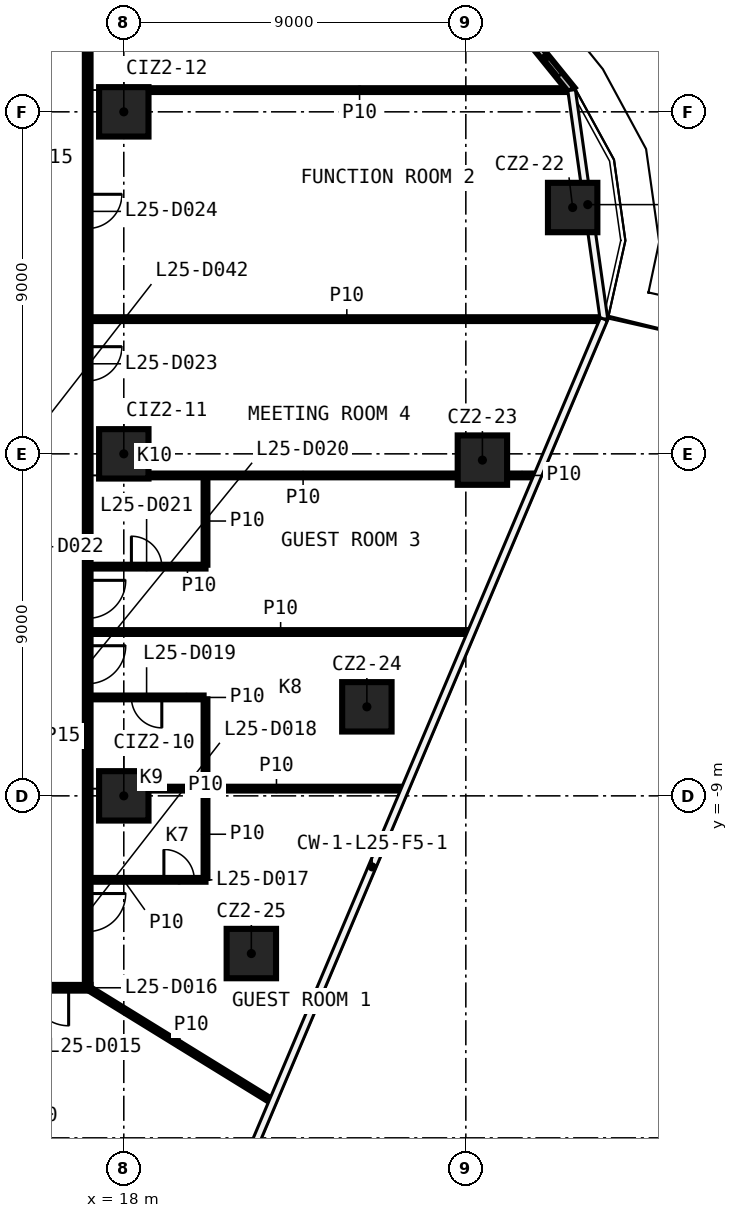
"""IFC4 building model, lengths in metres.
Left out: names, types, materials, properties, quantities, classifications, styles, units other than length and angle.
Written with IfcOpenShell. Run it as: python <this file> out.ifc"""

import sys

from ifc_helpers import new_model, si_unit, direction, frame, frame_2d, origin, origin_2d, place, context, subcontext, project, spatial, rectangle, extrude, element, fill, save


model = new_model("IFC4")
c1 = context("Model", 3, precision=1e-05, world=origin(), true_north=direction((0.0, 1.0)))
c2 = subcontext(c1, "Body", "Model", "MODEL_VIEW")
j1 = project(units=[si_unit("LENGTHUNIT", "METRE"), si_unit("PLANEANGLEUNIT", "RADIAN")], contexts=[c1])
p1 = place(None, origin())
s1 = spatial("IfcSite", under=j1, at=p1, CompositionType="ELEMENT")
p2 = place(p1, origin())
s2 = spatial("IfcBuilding", under=s1, at=p2, CompositionType="ELEMENT")
p3 = place(p2, frame((0.0, 0.0, 117.4)))
s3 = spatial("IfcBuildingStorey", under=s2, at=p3, CompositionType="ELEMENT", Elevation=117.4)
for number, where, z_axis, x_axis in (
    (1, (29.811, 6.482, 0.0), (0.0, 0.0, 1.0), (1.0, 0.0, 0.0)),
    (2, (27.436, -0.165, 0.0), (0.0, 0.0, 1.0), (1.0, 0.0, 0.0)),
    (3, (24.396, -6.657, 0.0), (0.0, 0.0, 1.0), (1.0, 0.0, 0.0)),
    (4, (21.356, -13.15, 0.0), (0.0, 0.0, 1.0), (1.0, 0.0, 0.0)),
    (5, (18.0, -9.0, 0.0), (0.0, 0.0, 1.0), (1.0, 0.0, 0.0)),
    (6, (18.0, 0.0, 0.0), (0.0, 0.0, 1.0), (1.0, 0.0, 0.0)),
    (7, (18.0, 9.0, 0.0), (0.0, 0.0, 1.0), (1.0, 0.0, 0.0)),
):
    element("IfcColumn", number, at=place(p3, frame(where, z_axis=z_axis, x_axis=x_axis)), inside=s3, PredefinedType="COLUMN", context=c2, shape_type="SweptSolid", body=[
        extrude(rectangle(XDim=1.3, YDim=1.3, at=origin_2d()), origin(), (0.0, 0.0, 1.0), 3.3),
    ])
p4 = place(p3, frame((17.125, -14.05, 0.0), z_axis=(0.0, 0.0, 1.0), x_axis=(-1.0, 0.0, 0.0)))
e8 = element("IfcWall", 8, at=p4, inside=s3, PredefinedType="PARTITIONING", context=c2, shape_type="SweptSolid", body=[
    extrude(rectangle(XDim=34.25, YDim=0.15, at=frame_2d((17.125, 0.0))), origin(), (0.0, 0.0, 1.0), 3.3),
])
p5 = place(p4, frame((32.089, 0.0, 0.0)))
e9 = element("IfcOpeningElement", 9, at=p5, cuts=e8, PredefinedType="OPENING", context=c2, shape_type="SweptSolid", body=[
    extrude(rectangle(XDim=0.9, YDim=2.1, at=frame_2d((0.45, 1.05))), frame((0.0, 0.085, 0.0), z_axis=(0.0, -1.0, 0.0), x_axis=(1.0, 0.0, 0.0)), (0.0, 0.0, 1.0), 0.17),
])
p6 = place(p4, frame((25.666, 0.0, 0.0)))
e10 = element("IfcOpeningElement", 10, at=p6, cuts=e8, PredefinedType="OPENING", context=c2, shape_type="SweptSolid", body=[
    extrude(rectangle(XDim=1.0, YDim=2.1, at=frame_2d((0.5, 1.05))), frame((0.0, 0.085, 0.0), z_axis=(0.0, -1.0, 0.0), x_axis=(1.0, 0.0, 0.0)), (0.0, 0.0, 1.0), 0.17),
])
p7 = place(p4, frame((18.714, 0.0, 0.0)))
e11 = element("IfcOpeningElement", 11, at=p7, cuts=e8, PredefinedType="OPENING", context=c2, shape_type="SweptSolid", body=[
    extrude(rectangle(XDim=1.0, YDim=2.1, at=frame_2d((0.5, 1.05))), frame((0.0, 0.085, 0.0), z_axis=(0.0, -1.0, 0.0), x_axis=(1.0, 0.0, 0.0)), (0.0, 0.0, 1.0), 0.17),
])
p8 = place(p4, frame((16.558, 0.0, 0.0)))
e12 = element("IfcOpeningElement", 12, at=p8, cuts=e8, PredefinedType="OPENING", context=c2, shape_type="SweptSolid", body=[
    extrude(rectangle(XDim=1.0, YDim=2.1, at=frame_2d((0.5, 1.05))), frame((0.0, 0.085, 0.0), z_axis=(0.0, -1.0, 0.0), x_axis=(1.0, 0.0, 0.0)), (0.0, 0.0, 1.0), 0.17),
])
p9 = place(p4, frame((9.602, 0.0, 0.0)))
e13 = element("IfcOpeningElement", 13, at=p9, cuts=e8, PredefinedType="OPENING", context=c2, shape_type="SweptSolid", body=[
    extrude(rectangle(XDim=1.0, YDim=2.1, at=frame_2d((0.5, 1.05))), frame((0.0, 0.085, 0.0), z_axis=(0.0, -1.0, 0.0), x_axis=(1.0, 0.0, 0.0)), (0.0, 0.0, 1.0), 0.17),
])
p10 = place(p4, frame((7.451, 0.0, 0.0)))
e14 = element("IfcOpeningElement", 14, at=p10, cuts=e8, PredefinedType="OPENING", context=c2, shape_type="SweptSolid", body=[
    extrude(rectangle(XDim=1.0, YDim=2.1, at=frame_2d((0.5, 1.05))), frame((0.0, 0.085, 0.0), z_axis=(0.0, -1.0, 0.0), x_axis=(1.0, 0.0, 0.0)), (0.0, 0.0, 1.0), 0.17),
])
p11 = place(p4, frame((0.576, 0.0, 0.0)))
e15 = element("IfcOpeningElement", 15, at=p11, cuts=e8, PredefinedType="OPENING", context=c2, shape_type="SweptSolid", body=[
    extrude(rectangle(XDim=1.0, YDim=2.1, at=frame_2d((0.5, 1.05))), frame((0.0, 0.085, 0.0), z_axis=(0.0, -1.0, 0.0), x_axis=(1.0, 0.0, 0.0)), (0.0, 0.0, 1.0), 0.17),
])
p12 = place(p3, frame((17.125, -11.21, 0.0), z_axis=(0.0, 0.0, 1.0), x_axis=(1.0, 0.0, 0.0)))
e16 = element("IfcWall", 16, at=p12, inside=s3, PredefinedType="PARTITIONING", context=c2, shape_type="SweptSolid", body=[
    extrude(rectangle(XDim=3.025, YDim=0.1, at=frame_2d((1.512, 0.0))), origin(), (0.0, 0.0, 1.0), 3.3),
])
p13 = place(p12, frame((1.93, 0.0, 0.0)))
e17 = element("IfcOpeningElement", 17, at=p13, cuts=e16, PredefinedType="OPENING", context=c2, shape_type="SweptSolid", body=[
    extrude(rectangle(XDim=0.8, YDim=2.1, at=frame_2d((0.4, 1.05))), frame((0.0, 0.06, 0.0), z_axis=(0.0, -1.0, 0.0), x_axis=(1.0, 0.0, 0.0)), (0.0, 0.0, 1.0), 0.12),
])
p14 = place(p3, frame((18.65, -8.81, 0.0), z_axis=(0.0, 0.0, 1.0), x_axis=(1.0, 0.0, 0.0)))
e18 = element("IfcWall", 18, at=p14, inside=s3, PredefinedType="PARTITIONING", context=c2, shape_type="SweptSolid", body=[
    extrude(rectangle(XDim=6.735, YDim=0.1, at=frame_2d((3.367, 0.0))), origin(), (0.0, 0.0, 1.0), 3.3),
])
p15 = place(p3, frame((20.1, -6.41, 0.0), z_axis=(0.0, 0.0, 1.0), x_axis=(-1.0, 0.0, 0.0)))
e19 = element("IfcWall", 19, at=p15, inside=s3, PredefinedType="PARTITIONING", context=c2, shape_type="SweptSolid", body=[
    extrude(rectangle(XDim=2.975, YDim=0.1, at=frame_2d((1.488, 0.0))), origin(), (0.0, 0.0, 1.0), 3.3),
])
p16 = place(p15, frame((1.1, 0.0, 0.0)))
e20 = element("IfcOpeningElement", 20, at=p16, cuts=e19, PredefinedType="OPENING", context=c2, shape_type="SweptSolid", body=[
    extrude(rectangle(XDim=0.8, YDim=2.1, at=frame_2d((0.4, 1.05))), frame((0.0, 0.06, 0.0), z_axis=(0.0, -1.0, 0.0), x_axis=(1.0, 0.0, 0.0)), (0.0, 0.0, 1.0), 0.12),
])
p17 = place(p3, frame((17.125, -4.689, 0.0), z_axis=(0.0, 0.0, 1.0), x_axis=(1.0, 0.0, 0.0)))
e21 = element("IfcWall", 21, at=p17, inside=s3, PredefinedType="PARTITIONING", context=c2, shape_type="SweptSolid", body=[
    extrude(rectangle(XDim=10.003, YDim=0.1, at=frame_2d((5.001, 0.0))), origin(), (0.0, 0.0, 1.0), 3.3),
])
p18 = place(p3, frame((17.125, -2.968, 0.0), z_axis=(0.0, 0.0, 1.0), x_axis=(1.0, 0.0, 0.0)))
e22 = element("IfcWall", 22, at=p18, inside=s3, PredefinedType="PARTITIONING", context=c2, shape_type="SweptSolid", body=[
    extrude(rectangle(XDim=3.025, YDim=0.1, at=frame_2d((1.512, 0.0))), origin(), (0.0, 0.0, 1.0), 3.3),
])
p19 = place(p18, frame((1.075, 0.0, 0.0)))
e23 = element("IfcOpeningElement", 23, at=p19, cuts=e22, PredefinedType="OPENING", context=c2, shape_type="SweptSolid", body=[
    extrude(rectangle(XDim=0.8, YDim=2.1, at=frame_2d((0.4, 1.05))), frame((0.0, 0.06, 0.0), z_axis=(0.0, -1.0, 0.0), x_axis=(1.0, 0.0, 0.0)), (0.0, 0.0, 1.0), 0.12),
])
p20 = place(p3, frame((18.65, -0.568, 0.0), z_axis=(0.0, 0.0, 1.0), x_axis=(1.0, 0.0, 0.0)))
e24 = element("IfcWall", 24, at=p20, inside=s3, PredefinedType="PARTITIONING", context=c2, shape_type="SweptSolid", body=[
    extrude(rectangle(XDim=8.136, YDim=0.1, at=frame_2d((4.068, 0.0))), origin(), (0.0, 0.0, 1.0), 3.3),
])
p21 = place(p3, frame((28.086, -0.568, 0.0), z_axis=(0.0, 0.0, 1.0), x_axis=(1.0, 0.0, 0.0)))
e25 = element("IfcWall", 25, at=p21, inside=s3, PredefinedType="PARTITIONING", context=c2, shape_type="SweptSolid", body=[
    extrude(rectangle(XDim=0.786, YDim=0.1, at=frame_2d((0.393, 0.0))), origin(), (0.0, 0.0, 1.0), 3.3),
])
p22 = place(p3, frame((17.125, 3.545, 0.0), z_axis=(0.0, 0.0, 1.0), x_axis=(1.0, 0.0, 0.0)))
e26 = element("IfcWall", 26, at=p22, inside=s3, PredefinedType="PARTITIONING", context=c2, shape_type="SweptSolid", body=[
    extrude(rectangle(XDim=13.487, YDim=0.1, at=frame_2d((6.743, 0.0))), origin(), (0.0, 0.0, 1.0), 3.3),
])
p23 = place(p3, frame((18.65, 9.572, 0.0), z_axis=(0.0, 0.0, 1.0), x_axis=(1.0, 0.0, 0.0)))
e27 = element("IfcWall", 27, at=p23, inside=s3, PredefinedType="PARTITIONING", context=c2, shape_type="SweptSolid", body=[
    extrude(rectangle(XDim=11.107, YDim=0.1, at=frame_2d((5.554, 0.0))), origin(), (0.0, 0.0, 1.0), 3.3),
])
p24 = place(p3, frame((20.15, -11.16, 0.0), z_axis=(0.0, 0.0, 1.0), x_axis=(0.0, 1.0, 0.0)))
e28 = element("IfcWall", 28, at=p24, inside=s3, PredefinedType="PARTITIONING", context=c2, shape_type="SweptSolid", body=[
    extrude(rectangle(XDim=2.3, YDim=0.1, at=frame_2d((1.15, 0.0))), origin(), (0.0, 0.0, 1.0), 3.3),
])
p25 = place(p3, frame((20.15, -8.76, 0.0), z_axis=(0.0, 0.0, 1.0), x_axis=(0.0, 1.0, 0.0)))
e29 = element("IfcWall", 29, at=p25, inside=s3, PredefinedType="PARTITIONING", context=c2, shape_type="SweptSolid", body=[
    extrude(rectangle(XDim=2.3, YDim=0.1, at=frame_2d((1.15, 0.0))), origin(), (0.0, 0.0, 1.0), 3.3),
])
p26 = place(p3, frame((20.15, -2.918, 0.0), z_axis=(0.0, 0.0, 1.0), x_axis=(0.0, 1.0, 0.0)))
e30 = element("IfcWall", 30, at=p26, inside=s3, PredefinedType="PARTITIONING", context=c2, shape_type="SweptSolid", body=[
    extrude(rectangle(XDim=2.3, YDim=0.1, at=frame_2d((1.15, 0.0))), origin(), (0.0, 0.0, 1.0), 3.3),
])
p27 = place(p3, frame((17.05, 13.975, 0.0), z_axis=(0.0, 0.0, 1.0), x_axis=(0.0, -1.0, 0.0)))
e31 = element("IfcWall", 31, at=p27, inside=s3, PredefinedType="PARTITIONING", context=c2, shape_type="SweptSolid", body=[
    extrude(rectangle(XDim=27.95, YDim=0.15, at=frame_2d((13.975, 0.0))), origin(), (0.0, 0.0, 1.0), 3.3),
])
p28 = place(p27, frame((25.545, 0.0, 0.0)))
e32 = element("IfcOpeningElement", 32, at=p28, cuts=e31, PredefinedType="OPENING", context=c2, shape_type="SweptSolid", body=[
    extrude(rectangle(XDim=1.0, YDim=2.1, at=frame_2d((0.5, 1.05))), frame((0.0, 0.085, 0.0), z_axis=(0.0, -1.0, 0.0), x_axis=(1.0, 0.0, 0.0)), (0.0, 0.0, 1.0), 0.17),
])
p29 = place(p27, frame((19.024, 0.0, 0.0)))
e33 = element("IfcOpeningElement", 33, at=p29, cuts=e31, PredefinedType="OPENING", context=c2, shape_type="SweptSolid", body=[
    extrude(rectangle(XDim=1.0, YDim=2.1, at=frame_2d((0.5, 1.05))), frame((0.0, 0.085, 0.0), z_axis=(0.0, -1.0, 0.0), x_axis=(1.0, 0.0, 0.0)), (0.0, 0.0, 1.0), 0.17),
])
p30 = place(p27, frame((17.303, 0.0, 0.0)))
e34 = element("IfcOpeningElement", 34, at=p30, cuts=e31, PredefinedType="OPENING", context=c2, shape_type="SweptSolid", body=[
    extrude(rectangle(XDim=1.0, YDim=2.1, at=frame_2d((0.5, 1.05))), frame((0.0, 0.085, 0.0), z_axis=(0.0, -1.0, 0.0), x_axis=(1.0, 0.0, 0.0)), (0.0, 0.0, 1.0), 0.17),
])
p31 = place(p27, frame((11.155, 0.0, 0.0)))
e35 = element("IfcOpeningElement", 35, at=p31, cuts=e31, PredefinedType="OPENING", context=c2, shape_type="SweptSolid", body=[
    extrude(rectangle(XDim=0.9, YDim=2.1, at=frame_2d((0.45, 1.05))), frame((0.0, 0.085, 0.0), z_axis=(0.0, -1.0, 0.0), x_axis=(1.0, 0.0, 0.0)), (0.0, 0.0, 1.0), 0.17),
])
p32 = place(p27, frame((7.145, 0.0, 0.0)))
e36 = element("IfcOpeningElement", 36, at=p32, cuts=e31, PredefinedType="OPENING", context=c2, shape_type="SweptSolid", body=[
    extrude(rectangle(XDim=0.9, YDim=2.1, at=frame_2d((0.45, 1.05))), frame((0.0, 0.085, 0.0), z_axis=(0.0, -1.0, 0.0), x_axis=(1.0, 0.0, 0.0)), (0.0, 0.0, 1.0), 0.17),
])
p33 = place(p27, frame((2.168, 0.0, 0.0)))
e37 = element("IfcOpeningElement", 37, at=p33, cuts=e31, PredefinedType="OPENING", context=c2, shape_type="SweptSolid", body=[
    extrude(rectangle(XDim=0.9, YDim=2.1, at=frame_2d((0.45, 1.05))), frame((0.0, 0.085, 0.0), z_axis=(0.0, -1.0, 0.0), x_axis=(1.0, 0.0, 0.0)), (0.0, 0.0, 1.0), 0.17),
])
p34 = place(p3, frame((17.05, -14.05, 0.0), z_axis=(0.0, 0.0, 1.0), x_axis=(0.851278656023, -0.524713874221, 0.0)))
e38 = element("IfcWall", 38, at=p34, inside=s3, PredefinedType="PARTITIONING", context=c2, shape_type="SweptSolid", body=[
    extrude(rectangle(XDim=5.7, YDim=0.1, at=frame_2d((2.85, 0.0))), origin(), (0.0, 0.0, 1.0), 3.3),
])
p35 = place(p3, frame((29.783, 9.572, 0.0), z_axis=(0.0, 0.0, 1.0), x_axis=(-0.629299136059, 0.777163172928, 0.0)))
e39 = element("IfcWall", 39, at=p35, inside=s3, PredefinedType="SOLIDWALL", context=c2, shape_type="SweptSolid", body=[
    extrude(rectangle(XDim=4.594, YDim=0.2, at=frame_2d((2.297, 0.0))), origin(), (0.0, 0.0, 1.0), 3.3),
])
p36 = place(p35, frame((2.0, 0.0, 0.6)))
e40 = element("IfcOpeningElement", 40, at=p36, cuts=e39, PredefinedType="OPENING", context=c2, shape_type="SweptSolid", body=[
    extrude(rectangle(XDim=1.6, YDim=2.4, at=frame_2d((0.8, 1.2))), frame((0.0, 0.11, 0.0), z_axis=(0.0, -1.0, 0.0), x_axis=(1.0, 0.0, 0.0)), (0.0, 0.0, 1.0), 0.22),
])
p37 = place(p35, frame((0.5, 0.0, 0.0)))
e41 = element("IfcOpeningElement", 41, at=p37, cuts=e39, PredefinedType="OPENING", context=c2, shape_type="SweptSolid", body=[
    extrude(rectangle(XDim=1.2, YDim=2.4, at=frame_2d((0.6, 1.2))), frame((0.0, 0.11, 0.0), z_axis=(0.0, -1.0, 0.0), x_axis=(1.0, 0.0, 0.0)), (0.0, 0.0, 1.0), 0.22),
])
p38 = place(p11, origin())
e42 = element("IfcDoor", 42, at=p38, inside=s3, OperationType="SINGLE_SWING_RIGHT", PredefinedType="DOOR", context=c2, shape_type="SweptSolid", body=[
    extrude(rectangle(XDim=1.0, YDim=2.1, at=frame_2d((0.5, 1.05))), frame((0.0, 0.025, 0.0), z_axis=(0.0, -1.0, 0.0), x_axis=(1.0, 0.0, 0.0)), (0.0, 0.0, 1.0), 0.05),
])
fill(e15, e42)
p39 = place(p13, origin())
e43 = element("IfcDoor", 43, at=p39, inside=s3, OperationType="SINGLE_SWING_RIGHT", PredefinedType="DOOR", context=c2, shape_type="SweptSolid", body=[
    extrude(rectangle(XDim=0.8, YDim=2.1, at=frame_2d((0.4, 1.05))), frame((0.0, 0.025, 0.0), z_axis=(0.0, -1.0, 0.0), x_axis=(1.0, 0.0, 0.0)), (0.0, 0.0, 1.0), 0.05),
])
fill(e17, e43)
p40 = place(p28, origin())
e44 = element("IfcDoor", 44, at=p40, inside=s3, OperationType="SINGLE_SWING_LEFT", PredefinedType="DOOR", context=c2, shape_type="SweptSolid", body=[
    extrude(rectangle(XDim=1.0, YDim=2.1, at=frame_2d((0.5, 1.05))), frame((0.0, 0.025, 0.0), z_axis=(0.0, -1.0, 0.0), x_axis=(1.0, 0.0, 0.0)), (0.0, 0.0, 1.0), 0.05),
])
fill(e32, e44)
p41 = place(p16, origin())
e45 = element("IfcDoor", 45, at=p41, inside=s3, OperationType="SINGLE_SWING_LEFT", PredefinedType="DOOR", context=c2, shape_type="SweptSolid", body=[
    extrude(rectangle(XDim=0.8, YDim=2.1, at=frame_2d((0.4, 1.05))), frame((0.0, 0.025, 0.0), z_axis=(0.0, -1.0, 0.0), x_axis=(1.0, 0.0, 0.0)), (0.0, 0.0, 1.0), 0.05),
])
fill(e20, e45)
p42 = place(p29, origin())
e46 = element("IfcDoor", 46, at=p42, inside=s3, OperationType="SINGLE_SWING_RIGHT", PredefinedType="DOOR", context=c2, shape_type="SweptSolid", body=[
    extrude(rectangle(XDim=1.0, YDim=2.1, at=frame_2d((0.5, 1.05))), frame((0.0, 0.025, 0.0), z_axis=(0.0, -1.0, 0.0), x_axis=(1.0, 0.0, 0.0)), (0.0, 0.0, 1.0), 0.05),
])
fill(e33, e46)
p43 = place(p19, origin())
e47 = element("IfcDoor", 47, at=p43, inside=s3, OperationType="SINGLE_SWING_RIGHT", PredefinedType="DOOR", context=c2, shape_type="SweptSolid", body=[
    extrude(rectangle(XDim=0.8, YDim=2.1, at=frame_2d((0.4, 1.05))), frame((0.0, 0.025, 0.0), z_axis=(0.0, -1.0, 0.0), x_axis=(1.0, 0.0, 0.0)), (0.0, 0.0, 1.0), 0.05),
])
fill(e23, e47)
p44 = place(p30, origin())
e48 = element("IfcDoor", 48, at=p44, inside=s3, OperationType="SINGLE_SWING_LEFT", PredefinedType="DOOR", context=c2, shape_type="SweptSolid", body=[
    extrude(rectangle(XDim=1.0, YDim=2.1, at=frame_2d((0.5, 1.05))), frame((0.0, 0.025, 0.0), z_axis=(0.0, -1.0, 0.0), x_axis=(1.0, 0.0, 0.0)), (0.0, 0.0, 1.0), 0.05),
])
fill(e34, e48)
p45 = place(p31, origin())
e49 = element("IfcDoor", 49, at=p45, inside=s3, OperationType="SINGLE_SWING_RIGHT", PredefinedType="DOOR", context=c2, shape_type="SweptSolid", body=[
    extrude(rectangle(XDim=0.9, YDim=2.1, at=frame_2d((0.45, 1.05))), frame((0.0, 0.025, 0.0), z_axis=(0.0, -1.0, 0.0), x_axis=(1.0, 0.0, 0.0)), (0.0, 0.0, 1.0), 0.05),
])
fill(e35, e49)
p46 = place(p32, origin())
e50 = element("IfcDoor", 50, at=p46, inside=s3, OperationType="SINGLE_SWING_LEFT", PredefinedType="DOOR", context=c2, shape_type="SweptSolid", body=[
    extrude(rectangle(XDim=0.9, YDim=2.1, at=frame_2d((0.45, 1.05))), frame((0.0, 0.025, 0.0), z_axis=(0.0, -1.0, 0.0), x_axis=(1.0, 0.0, 0.0)), (0.0, 0.0, 1.0), 0.05),
])
fill(e36, e50)
p47 = place(p37, origin())
e51 = element("IfcDoor", 51, at=p47, inside=s3, OperationType="SLIDING_TO_LEFT", PredefinedType="DOOR", context=c2, shape_type="SweptSolid", body=[
    extrude(rectangle(XDim=1.2, YDim=2.4, at=frame_2d((0.6, 1.2))), frame((0.0, 0.025, 0.0), z_axis=(0.0, -1.0, 0.0), x_axis=(1.0, 0.0, 0.0)), (0.0, 0.0, 1.0), 0.05),
])
fill(e41, e51)
save(model, sys.argv[1])
